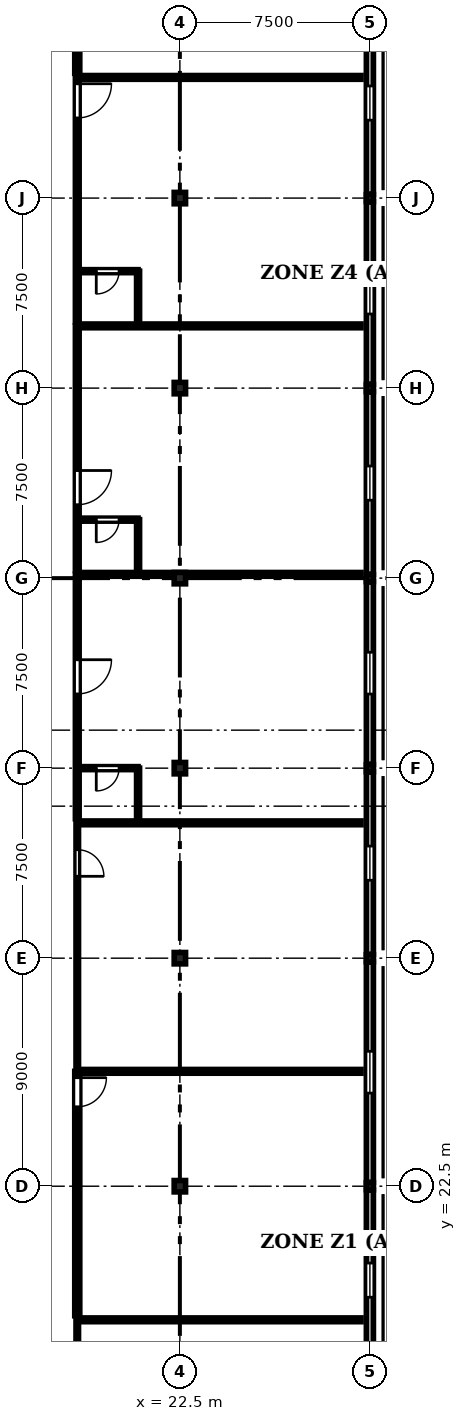
"""IFC4 building model, lengths in metres.
Left out: names, types, materials, properties, quantities, classifications, styles, units other than length and angle.
Written with IfcOpenShell. Run it as: python <this file> out.ifc"""

import sys

from ifc_helpers import new_model, si_unit, direction, frame, frame_2d, origin, origin_2d, place, context, subcontext, project, spatial, rectangle, extrude, element, fill, save


model = new_model("IFC4")
c1 = context("Model", 3, precision=1e-05, world=origin(), true_north=direction((0.0, 1.0)))
c2 = subcontext(c1, "Body", "Model", "MODEL_VIEW")
j1 = project(units=[si_unit("LENGTHUNIT", "METRE"), si_unit("PLANEANGLEUNIT", "RADIAN")], contexts=[c1])
p1 = place(None, origin())
s1 = spatial("IfcSite", under=j1, at=p1, CompositionType="ELEMENT")
p2 = place(p1, origin())
s2 = spatial("IfcBuilding", under=s1, at=p2, CompositionType="ELEMENT")
p3 = place(p2, frame((0.0, 0.0, 30.0)))
s3 = spatial("IfcBuildingStorey", under=s2, at=p3, CompositionType="ELEMENT", Elevation=30.0)
for number, where, z_axis, x_axis in (
    (1, (22.5, 22.5, 0.0), (0.0, 0.0, 1.0), (1.0, 0.0, 0.0)),
    (2, (22.5, 31.5, 0.0), (0.0, 0.0, 1.0), (1.0, 0.0, 0.0)),
    (3, (22.5, 39.0, 0.0), (0.0, 0.0, 1.0), (1.0, 0.0, 0.0)),
    (4, (22.5, 46.5, 0.0), (0.0, 0.0, 1.0), (1.0, 0.0, 0.0)),
    (5, (22.5, 54.0, 0.0), (0.0, 0.0, 1.0), (1.0, 0.0, 0.0)),
    (6, (22.5, 61.5, 0.0), (0.0, 0.0, 1.0), (1.0, 0.0, 0.0)),
):
    element("IfcColumn", number, at=place(p3, frame(where, z_axis=z_axis, x_axis=x_axis)), inside=s3, PredefinedType="COLUMN", context=c2, shape_type="SweptSolid", body=[
        extrude(rectangle(XDim=0.45, YDim=0.45, at=origin_2d()), origin(), (0.0, 0.0, 1.0), 4.05),
    ])
for number, where, z_axis, x_axis in (
    (7, (30.0, 22.5, 0.0), (0.0, 0.0, 1.0), (1.0, 0.0, 0.0)),
    (8, (30.0, 31.5, 0.0), (0.0, 0.0, 1.0), (1.0, 0.0, 0.0)),
    (9, (30.0, 39.0, 0.0), (0.0, 0.0, 1.0), (1.0, 0.0, 0.0)),
    (10, (30.0, 46.5, 0.0), (0.0, 0.0, 1.0), (1.0, 0.0, 0.0)),
    (11, (30.0, 54.0, 0.0), (0.0, 0.0, 1.0), (1.0, 0.0, 0.0)),
    (12, (30.0, 61.5, 0.0), (0.0, 0.0, 1.0), (1.0, 0.0, 0.0)),
):
    element("IfcColumn", number, at=place(p3, frame(where, z_axis=z_axis, x_axis=x_axis)), inside=s3, PredefinedType="COLUMN", context=c2, shape_type="SweptSolid", body=[
        extrude(rectangle(XDim=0.28, YDim=0.28, at=origin_2d()), origin(), (0.0, 0.0, 1.0), 4.05),
    ])
p4 = place(p3, frame((30.0, 22.35, 0.0), z_axis=(0.0, 0.0, 1.0), x_axis=(0.0, -1.0, 0.0)))
e13 = element("IfcWall", 13, at=p4, inside=s3, PredefinedType="STANDARD", context=c2, shape_type="SweptSolid", body=[
    extrude(rectangle(XDim=7.115, YDim=0.28, at=frame_2d((3.558, 0.0))), origin(), (0.0, 0.0, 1.0), 3.83),
])
p5 = place(p4, frame((2.883, 0.0, 0.85)))
e14 = element("IfcOpeningElement", 14, at=p5, cuts=e13, PredefinedType="OPENING", context=c2, shape_type="SweptSolid", body=[
    extrude(rectangle(XDim=1.35, YDim=2.25, at=frame_2d((0.675, 1.125))), frame((0.0, 0.15, 0.0), z_axis=(0.0, -1.0, 0.0), x_axis=(1.0, 0.0, 0.0)), (0.0, 0.0, 1.0), 0.3),
])
p6 = place(p3, frame((30.0, 31.35, 0.0), z_axis=(0.0, 0.0, 1.0), x_axis=(0.0, -1.0, 0.0)))
e15 = element("IfcWall", 15, at=p6, inside=s3, PredefinedType="STANDARD", context=c2, shape_type="SweptSolid", body=[
    extrude(rectangle(XDim=8.7, YDim=0.28, at=frame_2d((4.35, 0.0))), origin(), (0.0, 0.0, 1.0), 3.83),
])
p7 = place(p6, frame((3.525, 0.0, 0.85)))
e16 = element("IfcOpeningElement", 16, at=p7, cuts=e15, PredefinedType="OPENING", context=c2, shape_type="SweptSolid", body=[
    extrude(rectangle(XDim=1.65, YDim=2.25, at=frame_2d((0.825, 1.125))), frame((0.0, 0.15, 0.0), z_axis=(0.0, -1.0, 0.0), x_axis=(1.0, 0.0, 0.0)), (0.0, 0.0, 1.0), 0.3),
])
p8 = place(p3, frame((30.0, 38.85, 0.0), z_axis=(0.0, 0.0, 1.0), x_axis=(0.0, -1.0, 0.0)))
e17 = element("IfcWall", 17, at=p8, inside=s3, PredefinedType="STANDARD", context=c2, shape_type="SweptSolid", body=[
    extrude(rectangle(XDim=7.2, YDim=0.28, at=frame_2d((3.6, 0.0))), origin(), (0.0, 0.0, 1.0), 3.83),
])
p9 = place(p8, frame((2.925, 0.0, 0.85)))
e18 = element("IfcOpeningElement", 18, at=p9, cuts=e17, PredefinedType="OPENING", context=c2, shape_type="SweptSolid", body=[
    extrude(rectangle(XDim=1.35, YDim=2.25, at=frame_2d((0.675, 1.125))), frame((0.0, 0.15, 0.0), z_axis=(0.0, -1.0, 0.0), x_axis=(1.0, 0.0, 0.0)), (0.0, 0.0, 1.0), 0.3),
])
p10 = place(p3, frame((30.0, 46.35, 0.0), z_axis=(0.0, 0.0, 1.0), x_axis=(0.0, -1.0, 0.0)))
e19 = element("IfcWall", 19, at=p10, inside=s3, PredefinedType="STANDARD", context=c2, shape_type="SweptSolid", body=[
    extrude(rectangle(XDim=7.2, YDim=0.28, at=frame_2d((3.6, 0.0))), origin(), (0.0, 0.0, 1.0), 3.83),
])
p11 = place(p10, frame((2.775, 0.0, 0.85)))
e20 = element("IfcOpeningElement", 20, at=p11, cuts=e19, PredefinedType="OPENING", context=c2, shape_type="SweptSolid", body=[
    extrude(rectangle(XDim=1.65, YDim=2.25, at=frame_2d((0.825, 1.125))), frame((0.0, 0.15, 0.0), z_axis=(0.0, -1.0, 0.0), x_axis=(1.0, 0.0, 0.0)), (0.0, 0.0, 1.0), 0.3),
])
p12 = place(p3, frame((30.0, 53.85, 0.0), z_axis=(0.0, 0.0, 1.0), x_axis=(0.0, -1.0, 0.0)))
e21 = element("IfcWall", 21, at=p12, inside=s3, PredefinedType="STANDARD", context=c2, shape_type="SweptSolid", body=[
    extrude(rectangle(XDim=7.2, YDim=0.28, at=frame_2d((3.6, 0.0))), origin(), (0.0, 0.0, 1.0), 3.83),
])
p13 = place(p12, frame((2.925, 0.0, 0.85)))
e22 = element("IfcOpeningElement", 22, at=p13, cuts=e21, PredefinedType="OPENING", context=c2, shape_type="SweptSolid", body=[
    extrude(rectangle(XDim=1.35, YDim=2.25, at=frame_2d((0.675, 1.125))), frame((0.0, 0.15, 0.0), z_axis=(0.0, -1.0, 0.0), x_axis=(1.0, 0.0, 0.0)), (0.0, 0.0, 1.0), 0.3),
])
p14 = place(p3, frame((30.0, 61.35, 0.0), z_axis=(0.0, 0.0, 1.0), x_axis=(0.0, -1.0, 0.0)))
e23 = element("IfcWall", 23, at=p14, inside=s3, PredefinedType="STANDARD", context=c2, shape_type="SweptSolid", body=[
    extrude(rectangle(XDim=7.2, YDim=0.28, at=frame_2d((3.6, 0.0))), origin(), (0.0, 0.0, 1.0), 3.23),
])
p15 = place(p14, frame((2.775, 0.0, 0.85)))
e24 = element("IfcOpeningElement", 24, at=p15, cuts=e23, PredefinedType="OPENING", context=c2, shape_type="SweptSolid", body=[
    extrude(rectangle(XDim=1.65, YDim=2.1, at=frame_2d((0.825, 1.05))), frame((0.0, 0.15, 0.0), z_axis=(0.0, -1.0, 0.0), x_axis=(1.0, 0.0, 0.0)), (0.0, 0.0, 1.0), 0.3),
])
p16 = place(p3, frame((30.0, 68.85, 0.0), z_axis=(0.0, 0.0, 1.0), x_axis=(0.0, -1.0, 0.0)))
e25 = element("IfcWall", 25, at=p16, inside=s3, PredefinedType="STANDARD", context=c2, shape_type="SweptSolid", body=[
    extrude(rectangle(XDim=7.2, YDim=0.28, at=frame_2d((3.6, 0.0))), origin(), (0.0, 0.0, 1.0), 3.83),
])
p17 = place(p16, frame((2.925, 0.0, 0.85)))
e26 = element("IfcOpeningElement", 26, at=p17, cuts=e25, PredefinedType="OPENING", context=c2, shape_type="SweptSolid", body=[
    extrude(rectangle(XDim=1.35, YDim=2.25, at=frame_2d((0.675, 1.125))), frame((0.0, 0.15, 0.0), z_axis=(0.0, -1.0, 0.0), x_axis=(1.0, 0.0, 0.0)), (0.0, 0.0, 1.0), 0.3),
])
p18 = place(p3, frame((18.45, 17.227, 0.0), z_axis=(0.0, 0.0, 1.0), x_axis=(0.0, -1.0, 0.0)))
e27 = element("IfcWall", 27, at=p18, inside=s3, PredefinedType="PARTITIONING", context=c2, shape_type="SweptSolid", body=[
    extrude(rectangle(XDim=8.127, YDim=0.1, at=frame_2d((4.063, 0.0))), origin(), (0.0, 0.0, 1.0), 3.815),
])
p19 = place(p18, frame((5.432, 0.0, 0.0)))
e28 = element("IfcOpeningElement", 28, at=p19, cuts=e27, PredefinedType="OPENING", context=c2, shape_type="SweptSolid", body=[
    extrude(rectangle(XDim=1.15, YDim=2.2, at=frame_2d((0.575, 1.1))), frame((0.0, 0.06, 0.0), z_axis=(0.0, -1.0, 0.0), x_axis=(1.0, 0.0, 0.0)), (0.0, 0.0, 1.0), 0.12),
])
p20 = place(p3, frame((18.45, 27.034, 0.0), z_axis=(0.0, 0.0, 1.0), x_axis=(0.0, -1.0, 0.0)))
e29 = element("IfcWall", 29, at=p20, inside=s3, PredefinedType="STANDARD", context=c2, shape_type="SweptSolid", body=[
    extrude(rectangle(XDim=9.647, YDim=0.2, at=frame_2d((4.823, 0.0))), origin(), (0.0, 0.0, 1.0), 3.815),
])
p21 = place(p20, frame((0.25, 0.0, 0.0)))
e30 = element("IfcOpeningElement", 30, at=p21, cuts=e29, PredefinedType="OPENING", context=c2, shape_type="SweptSolid", body=[
    extrude(rectangle(XDim=1.15, YDim=2.2, at=frame_2d((0.575, 1.1))), frame((0.0, 0.11, 0.0), z_axis=(0.0, -1.0, 0.0), x_axis=(1.0, 0.0, 0.0)), (0.0, 0.0, 1.0), 0.22),
])
p22 = place(p3, frame((18.45, 36.841, 0.0), z_axis=(0.0, 0.0, 1.0), x_axis=(0.0, -1.0, 0.0)))
e31 = element("IfcWall", 31, at=p22, inside=s3, PredefinedType="PARTITIONING", context=c2, shape_type="SweptSolid", body=[
    extrude(rectangle(XDim=9.647, YDim=0.1, at=frame_2d((4.823, 0.0))), origin(), (0.0, 0.0, 1.0), 3.815),
])
p23 = place(p22, frame((1.06, 0.0, 0.0)))
e32 = element("IfcOpeningElement", 32, at=p23, cuts=e31, PredefinedType="OPENING", context=c2, shape_type="SweptSolid", body=[
    extrude(rectangle(XDim=1.05, YDim=2.2, at=frame_2d((0.525, 1.1))), frame((0.0, 0.06, 0.0), z_axis=(0.0, -1.0, 0.0), x_axis=(1.0, 0.0, 0.0)), (0.0, 0.0, 1.0), 0.12),
])
p24 = place(p3, frame((18.45, 46.649, 0.0), z_axis=(0.0, 0.0, 1.0), x_axis=(0.0, -1.0, 0.0)))
e33 = element("IfcWall", 33, at=p24, inside=s3, PredefinedType="PARTITIONING", context=c2, shape_type="SweptSolid", body=[
    extrude(rectangle(XDim=9.647, YDim=0.15, at=frame_2d((4.824, 0.0))), origin(), (0.0, 0.0, 1.0), 3.815),
])
p25 = place(p24, frame((3.369, 0.0, 0.0)))
e34 = element("IfcOpeningElement", 34, at=p25, cuts=e33, PredefinedType="OPENING", context=c2, shape_type="SweptSolid", body=[
    extrude(rectangle(XDim=1.35, YDim=2.25, at=frame_2d((0.675, 1.125))), frame((0.0, 0.085, 0.0), z_axis=(0.0, -1.0, 0.0), x_axis=(1.0, 0.0, 0.0)), (0.0, 0.0, 1.0), 0.17),
])
p26 = place(p3, frame((20.85, 39.001, 0.0), z_axis=(0.0, 0.0, 1.0), x_axis=(-1.0, 0.0, 0.0)))
e35 = element("IfcWall", 35, at=p26, inside=s3, PredefinedType="PARTITIONING", context=c2, shape_type="SweptSolid", body=[
    extrude(rectangle(XDim=2.4, YDim=0.12, at=frame_2d((1.2, 0.0))), origin(), (0.0, 0.0, 1.0), 3.815),
])
p27 = place(p26, frame((0.75, 0.0, 0.0)))
e36 = element("IfcOpeningElement", 36, at=p27, cuts=e35, PredefinedType="OPENING", context=c2, shape_type="SweptSolid", body=[
    extrude(rectangle(XDim=0.9, YDim=2.1, at=frame_2d((0.45, 1.05))), frame((0.0, 0.07, 0.0), z_axis=(0.0, -1.0, 0.0), x_axis=(1.0, 0.0, 0.0)), (0.0, 0.0, 1.0), 0.14),
])
p28 = place(p3, frame((20.85, 37.001, 0.0), z_axis=(0.0, 0.0, 1.0), x_axis=(0.0, 1.0, 0.0)))
e37 = element("IfcWall", 37, at=p28, inside=s3, PredefinedType="PARTITIONING", context=c2, shape_type="SweptSolid", body=[
    extrude(rectangle(XDim=2.0, YDim=0.12, at=frame_2d((1.0, 0.0))), origin(), (0.0, 0.0, 1.0), 3.815),
])
p29 = place(p3, frame((18.45, 56.456, 0.0), z_axis=(0.0, 0.0, 1.0), x_axis=(0.0, -1.0, 0.0)))
e38 = element("IfcWall", 38, at=p29, inside=s3, PredefinedType="PARTITIONING", context=c2, shape_type="SweptSolid", body=[
    extrude(rectangle(XDim=9.647, YDim=0.15, at=frame_2d((4.824, 0.0))), origin(), (0.0, 0.0, 1.0), 3.815),
])
p30 = place(p29, frame((5.708, 0.0, 0.0)))
e39 = element("IfcOpeningElement", 39, at=p30, cuts=e38, PredefinedType="OPENING", context=c2, shape_type="SweptSolid", body=[
    extrude(rectangle(XDim=1.35, YDim=2.25, at=frame_2d((0.675, 1.125))), frame((0.0, 0.085, 0.0), z_axis=(0.0, -1.0, 0.0), x_axis=(1.0, 0.0, 0.0)), (0.0, 0.0, 1.0), 0.17),
])
p31 = place(p3, frame((20.85, 48.809, 0.0), z_axis=(0.0, 0.0, 1.0), x_axis=(-1.0, 0.0, 0.0)))
e40 = element("IfcWall", 40, at=p31, inside=s3, PredefinedType="PARTITIONING", context=c2, shape_type="SweptSolid", body=[
    extrude(rectangle(XDim=2.4, YDim=0.12, at=frame_2d((1.2, 0.0))), origin(), (0.0, 0.0, 1.0), 3.815),
])
p32 = place(p31, frame((0.75, 0.0, 0.0)))
e41 = element("IfcOpeningElement", 41, at=p32, cuts=e40, PredefinedType="OPENING", context=c2, shape_type="SweptSolid", body=[
    extrude(rectangle(XDim=0.9, YDim=2.1, at=frame_2d((0.45, 1.05))), frame((0.0, 0.07, 0.0), z_axis=(0.0, -1.0, 0.0), x_axis=(1.0, 0.0, 0.0)), (0.0, 0.0, 1.0), 0.14),
])
p33 = place(p3, frame((20.85, 46.809, 0.0), z_axis=(0.0, 0.0, 1.0), x_axis=(0.0, 1.0, 0.0)))
e42 = element("IfcWall", 42, at=p33, inside=s3, PredefinedType="PARTITIONING", context=c2, shape_type="SweptSolid", body=[
    extrude(rectangle(XDim=2.0, YDim=0.12, at=frame_2d((1.0, 0.0))), origin(), (0.0, 0.0, 1.0), 3.815),
])
p34 = place(p3, frame((18.45, 66.263, 0.0), z_axis=(0.0, 0.0, 1.0), x_axis=(0.0, -1.0, 0.0)))
e43 = element("IfcWall", 43, at=p34, inside=s3, PredefinedType="PARTITIONING", context=c2, shape_type="SweptSolid", body=[
    extrude(rectangle(XDim=9.647, YDim=0.15, at=frame_2d((4.824, 0.0))), origin(), (0.0, 0.0, 1.0), 3.815),
])
p35 = place(p34, frame((0.25, 0.0, 0.0)))
e44 = element("IfcOpeningElement", 44, at=p35, cuts=e43, PredefinedType="OPENING", context=c2, shape_type="SweptSolid", body=[
    extrude(rectangle(XDim=1.35, YDim=2.25, at=frame_2d((0.675, 1.125))), frame((0.0, 0.085, 0.0), z_axis=(0.0, -1.0, 0.0), x_axis=(1.0, 0.0, 0.0)), (0.0, 0.0, 1.0), 0.17),
])
p36 = place(p3, frame((20.85, 58.616, 0.0), z_axis=(0.0, 0.0, 1.0), x_axis=(-1.0, 0.0, 0.0)))
e45 = element("IfcWall", 45, at=p36, inside=s3, PredefinedType="PARTITIONING", context=c2, shape_type="SweptSolid", body=[
    extrude(rectangle(XDim=2.4, YDim=0.12, at=frame_2d((1.2, 0.0))), origin(), (0.0, 0.0, 1.0), 3.815),
])
p37 = place(p36, frame((0.75, 0.0, 0.0)))
e46 = element("IfcOpeningElement", 46, at=p37, cuts=e45, PredefinedType="OPENING", context=c2, shape_type="SweptSolid", body=[
    extrude(rectangle(XDim=0.9, YDim=2.1, at=frame_2d((0.45, 1.05))), frame((0.0, 0.07, 0.0), z_axis=(0.0, -1.0, 0.0), x_axis=(1.0, 0.0, 0.0)), (0.0, 0.0, 1.0), 0.14),
])
p38 = place(p3, frame((20.85, 56.616, 0.0), z_axis=(0.0, 0.0, 1.0), x_axis=(0.0, 1.0, 0.0)))
e47 = element("IfcWall", 47, at=p38, inside=s3, PredefinedType="PARTITIONING", context=c2, shape_type="SweptSolid", body=[
    extrude(rectangle(XDim=2.0, YDim=0.12, at=frame_2d((1.0, 0.0))), origin(), (0.0, 0.0, 1.0), 3.815),
])
p39 = place(p3, frame((18.45, 74.9, 0.0), z_axis=(0.0, 0.0, 1.0), x_axis=(0.0, -1.0, 0.0)))
e48 = element("IfcWall", 48, at=p39, inside=s3, PredefinedType="STANDARD", context=c2, shape_type="SweptSolid", body=[
    extrude(rectangle(XDim=8.477, YDim=0.2, at=frame_2d((4.239, 0.0))), origin(), (0.0, 0.0, 1.0), 3.815),
])
p40 = place(p39, frame((1.656, 0.0, 0.0)))
e49 = element("IfcOpeningElement", 49, at=p40, cuts=e48, PredefinedType="OPENING", context=c2, shape_type="SweptSolid", body=[
    extrude(rectangle(XDim=0.95, YDim=2.15, at=frame_2d((0.475, 1.075))), frame((0.0, 0.11, 0.0), z_axis=(0.0, -1.0, 0.0), x_axis=(1.0, 0.0, 0.0)), (0.0, 0.0, 1.0), 0.22),
])
for number, where, z_axis, x_axis in (
    (50, (18.45, 17.227, 0.0), (0.0, 0.0, 1.0), (1.0, 0.0, 0.0)),
    (51, (18.45, 27.034, 0.0), (0.0, 0.0, 1.0), (1.0, 0.0, 0.0)),
    (52, (18.45, 36.841, 0.0), (0.0, 0.0, 1.0), (1.0, 0.0, 0.0)),
    (53, (18.45, 46.649, 0.0), (0.0, 0.0, 1.0), (1.0, 0.0, 0.0)),
    (54, (18.45, 56.456, 0.0), (0.0, 0.0, 1.0), (1.0, 0.0, 0.0)),
    (55, (18.45, 66.263, 0.0), (0.0, 0.0, 1.0), (1.0, 0.0, 0.0)),
):
    element("IfcWall", number, at=place(p3, frame(where, z_axis=z_axis, x_axis=x_axis)), inside=s3, PredefinedType="PARTITIONING", context=c2, shape_type="SweptSolid", body=[
        extrude(rectangle(XDim=11.2, YDim=0.15, at=frame_2d((5.6, 0.0))), origin(), (0.0, 0.0, 1.0), 3.815),
    ])
p41 = place(p5, origin())
e56 = element("IfcWindow", 56, at=p41, inside=s3, PartitioningType="SINGLE_PANEL", PredefinedType="WINDOW", context=c2, shape_type="SweptSolid", body=[
    extrude(rectangle(XDim=1.35, YDim=2.25, at=frame_2d((0.675, 1.125))), frame((0.0, 0.03, 0.0), z_axis=(0.0, -1.0, 0.0), x_axis=(1.0, 0.0, 0.0)), (0.0, 0.0, 1.0), 0.06),
])
fill(e14, e56)
p42 = place(p7, origin())
e57 = element("IfcWindow", 57, at=p42, inside=s3, PartitioningType="SINGLE_PANEL", PredefinedType="WINDOW", context=c2, shape_type="SweptSolid", body=[
    extrude(rectangle(XDim=1.65, YDim=2.25, at=frame_2d((0.825, 1.125))), frame((0.0, 0.03, 0.0), z_axis=(0.0, -1.0, 0.0), x_axis=(1.0, 0.0, 0.0)), (0.0, 0.0, 1.0), 0.06),
])
fill(e16, e57)
p43 = place(p9, origin())
e58 = element("IfcWindow", 58, at=p43, inside=s3, PartitioningType="SINGLE_PANEL", PredefinedType="WINDOW", context=c2, shape_type="SweptSolid", body=[
    extrude(rectangle(XDim=1.35, YDim=2.25, at=frame_2d((0.675, 1.125))), frame((0.0, 0.03, 0.0), z_axis=(0.0, -1.0, 0.0), x_axis=(1.0, 0.0, 0.0)), (0.0, 0.0, 1.0), 0.06),
])
fill(e18, e58)
p44 = place(p11, origin())
e59 = element("IfcWindow", 59, at=p44, inside=s3, PartitioningType="SINGLE_PANEL", PredefinedType="WINDOW", context=c2, shape_type="SweptSolid", body=[
    extrude(rectangle(XDim=1.65, YDim=2.25, at=frame_2d((0.825, 1.125))), frame((0.0, 0.03, 0.0), z_axis=(0.0, -1.0, 0.0), x_axis=(1.0, 0.0, 0.0)), (0.0, 0.0, 1.0), 0.06),
])
fill(e20, e59)
p45 = place(p13, origin())
e60 = element("IfcWindow", 60, at=p45, inside=s3, PartitioningType="SINGLE_PANEL", PredefinedType="WINDOW", context=c2, shape_type="SweptSolid", body=[
    extrude(rectangle(XDim=1.35, YDim=2.25, at=frame_2d((0.675, 1.125))), frame((0.0, 0.03, 0.0), z_axis=(0.0, -1.0, 0.0), x_axis=(1.0, 0.0, 0.0)), (0.0, 0.0, 1.0), 0.06),
])
fill(e22, e60)
p46 = place(p15, origin())
e61 = element("IfcWindow", 61, at=p46, inside=s3, PartitioningType="SINGLE_PANEL", PredefinedType="WINDOW", context=c2, shape_type="SweptSolid", body=[
    extrude(rectangle(XDim=1.65, YDim=2.1, at=frame_2d((0.825, 1.05))), frame((0.0, 0.03, 0.0), z_axis=(0.0, -1.0, 0.0), x_axis=(1.0, 0.0, 0.0)), (0.0, 0.0, 1.0), 0.06),
])
fill(e24, e61)
p47 = place(p17, origin())
e62 = element("IfcWindow", 62, at=p47, inside=s3, PartitioningType="SINGLE_PANEL", PredefinedType="WINDOW", context=c2, shape_type="SweptSolid", body=[
    extrude(rectangle(XDim=1.35, YDim=2.25, at=frame_2d((0.675, 1.125))), frame((0.0, 0.03, 0.0), z_axis=(0.0, -1.0, 0.0), x_axis=(1.0, 0.0, 0.0)), (0.0, 0.0, 1.0), 0.06),
])
fill(e26, e62)
p48 = place(p21, origin())
e63 = element("IfcDoor", 63, at=p48, inside=s3, OperationType="SINGLE_SWING_LEFT", PredefinedType="DOOR", context=c2, shape_type="SweptSolid", body=[
    extrude(rectangle(XDim=1.15, YDim=2.2, at=frame_2d((0.575, 1.1))), frame((0.0, 0.025, 0.0), z_axis=(0.0, -1.0, 0.0), x_axis=(1.0, 0.0, 0.0)), (0.0, 0.0, 1.0), 0.05),
])
fill(e30, e63)
p49 = place(p23, origin())
e64 = element("IfcDoor", 64, at=p49, inside=s3, OperationType="SINGLE_SWING_RIGHT", PredefinedType="DOOR", context=c2, shape_type="SweptSolid", body=[
    extrude(rectangle(XDim=1.05, YDim=2.2, at=frame_2d((0.525, 1.1))), frame((0.0, 0.025, 0.0), z_axis=(0.0, -1.0, 0.0), x_axis=(1.0, 0.0, 0.0)), (0.0, 0.0, 1.0), 0.05),
])
fill(e32, e64)
p50 = place(p25, origin())
e65 = element("IfcDoor", 65, at=p50, inside=s3, OperationType="SINGLE_SWING_LEFT", PredefinedType="DOOR", context=c2, shape_type="SweptSolid", body=[
    extrude(rectangle(XDim=1.35, YDim=2.25, at=frame_2d((0.675, 1.125))), frame((0.0, 0.025, 0.0), z_axis=(0.0, -1.0, 0.0), x_axis=(1.0, 0.0, 0.0)), (0.0, 0.0, 1.0), 0.05),
])
fill(e34, e65)
p51 = place(p27, origin())
e66 = element("IfcDoor", 66, at=p51, inside=s3, OperationType="SINGLE_SWING_RIGHT", PredefinedType="DOOR", context=c2, shape_type="SweptSolid", body=[
    extrude(rectangle(XDim=0.9, YDim=2.1, at=frame_2d((0.45, 1.05))), frame((0.0, 0.025, 0.0), z_axis=(0.0, -1.0, 0.0), x_axis=(1.0, 0.0, 0.0)), (0.0, 0.0, 1.0), 0.05),
])
fill(e36, e66)
p52 = place(p30, origin())
e67 = element("IfcDoor", 67, at=p52, inside=s3, OperationType="SINGLE_SWING_LEFT", PredefinedType="DOOR", context=c2, shape_type="SweptSolid", body=[
    extrude(rectangle(XDim=1.35, YDim=2.25, at=frame_2d((0.675, 1.125))), frame((0.0, 0.025, 0.0), z_axis=(0.0, -1.0, 0.0), x_axis=(1.0, 0.0, 0.0)), (0.0, 0.0, 1.0), 0.05),
])
fill(e39, e67)
p53 = place(p32, origin())
e68 = element("IfcDoor", 68, at=p53, inside=s3, OperationType="SINGLE_SWING_RIGHT", PredefinedType="DOOR", context=c2, shape_type="SweptSolid", body=[
    extrude(rectangle(XDim=0.9, YDim=2.1, at=frame_2d((0.45, 1.05))), frame((0.0, 0.025, 0.0), z_axis=(0.0, -1.0, 0.0), x_axis=(1.0, 0.0, 0.0)), (0.0, 0.0, 1.0), 0.05),
])
fill(e41, e68)
p54 = place(p35, origin())
e69 = element("IfcDoor", 69, at=p54, inside=s3, OperationType="SINGLE_SWING_LEFT", PredefinedType="DOOR", context=c2, shape_type="SweptSolid", body=[
    extrude(rectangle(XDim=1.35, YDim=2.25, at=frame_2d((0.675, 1.125))), frame((0.0, 0.025, 0.0), z_axis=(0.0, -1.0, 0.0), x_axis=(1.0, 0.0, 0.0)), (0.0, 0.0, 1.0), 0.05),
])
fill(e44, e69)
p55 = place(p37, origin())
e70 = element("IfcDoor", 70, at=p55, inside=s3, OperationType="SINGLE_SWING_RIGHT", PredefinedType="DOOR", context=c2, shape_type="SweptSolid", body=[
    extrude(rectangle(XDim=0.9, YDim=2.1, at=frame_2d((0.45, 1.05))), frame((0.0, 0.025, 0.0), z_axis=(0.0, -1.0, 0.0), x_axis=(1.0, 0.0, 0.0)), (0.0, 0.0, 1.0), 0.05),
])
fill(e46, e70)
save(model, sys.argv[1])
